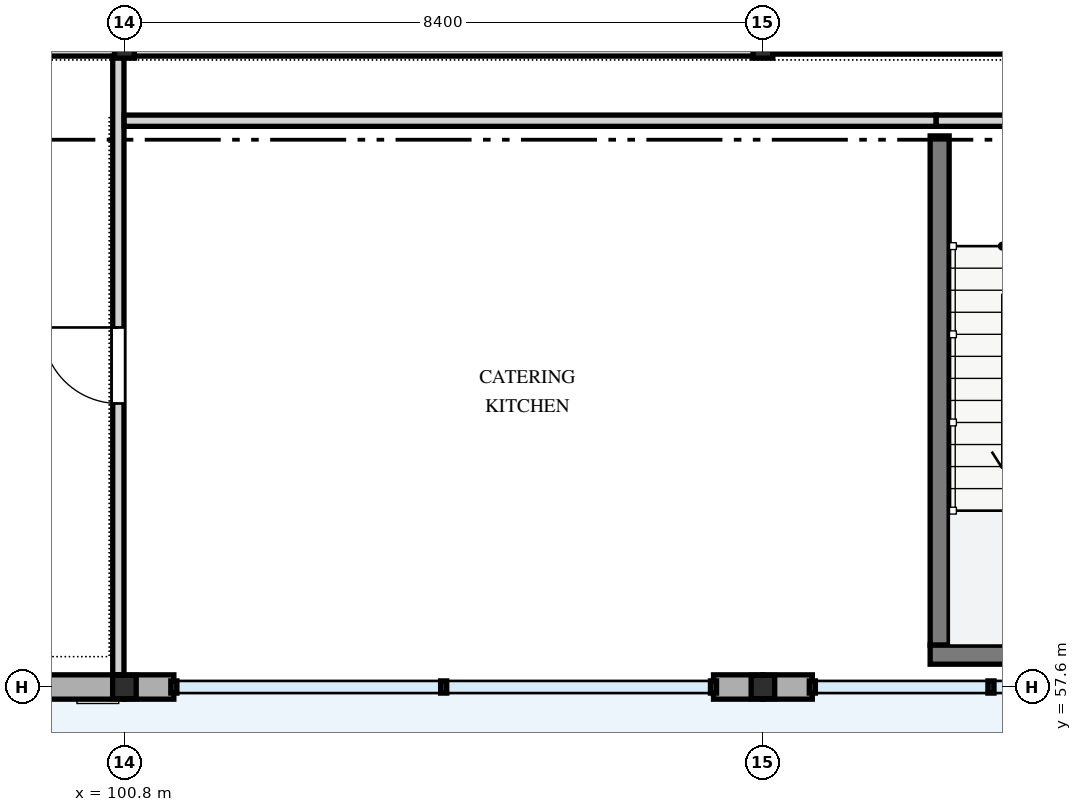
"""IFC4 building model, lengths in metres.
Left out: names, types, materials, properties, quantities, classifications, styles, units other than length and angle.
Written with IfcOpenShell. Run it as: python <this file> out.ifc"""

import sys

from ifc_helpers import new_model, si_unit, direction, frame, frame_2d, origin, origin_2d, place, context, subcontext, project, spatial, rectangle, i_section, extrude, element, fill, save


model = new_model("IFC4")
c1 = context("Model", 3, precision=1e-05, world=origin(), true_north=direction((0.0, 1.0)))
c2 = subcontext(c1, "Body", "Model", "MODEL_VIEW")
j1 = project(units=[si_unit("LENGTHUNIT", "METRE"), si_unit("PLANEANGLEUNIT", "RADIAN")], contexts=[c1])
p1 = place(None, origin())
s1 = spatial("IfcSite", under=j1, at=p1, CompositionType="ELEMENT")
p2 = place(p1, origin())
s2 = spatial("IfcBuilding", under=s1, at=p2, CompositionType="ELEMENT")
p3 = place(p2, origin())
s3 = spatial("IfcBuildingStorey", under=s2, at=p3, CompositionType="ELEMENT", Elevation=0.0)
p4 = place(p3, frame((100.8, 57.6, 0.0), z_axis=(0.0, 0.0, 1.0), x_axis=(1.0, 0.0, 0.0)))
e1 = element("IfcColumn", 1, at=p4, inside=s3, PredefinedType="COLUMN", context=c2, shape_type="SweptSolid", body=[
    extrude(i_section(OverallWidth=0.31, OverallDepth=0.308, WebThickness=0.015, FlangeThickness=0.015, FilletRadius=0.012, at=origin_2d()), origin(), (0.0, 0.0, 1.0), 4.5),
])
p5 = place(p3, frame((100.8, 66.0, 0.0), z_axis=(0.0, 0.0, 1.0), x_axis=(1.0, 0.0, 0.0)))
e2 = element("IfcColumn", 2, at=p5, inside=s3, PredefinedType="COLUMN", context=c2, shape_type="SweptSolid", body=[
    extrude(i_section(OverallWidth=0.26, OverallDepth=0.254, WebThickness=0.014, FlangeThickness=0.014, FilletRadius=0.01, at=origin_2d()), origin(), (0.0, 0.0, 1.0), 4.5),
])
p6 = place(p3, frame((109.2, 57.6, 0.0), z_axis=(0.0, 0.0, 1.0), x_axis=(1.0, 0.0, 0.0)))
e3 = element("IfcColumn", 3, at=p6, inside=s3, PredefinedType="COLUMN", context=c2, shape_type="SweptSolid", body=[
    extrude(i_section(OverallWidth=0.31, OverallDepth=0.308, WebThickness=0.015, FlangeThickness=0.015, FilletRadius=0.012, at=origin_2d()), origin(), (0.0, 0.0, 1.0), 4.5),
])
p7 = place(p3, frame((109.2, 66.0, 0.0), z_axis=(0.0, 0.0, 1.0), x_axis=(1.0, 0.0, 0.0)))
e4 = element("IfcColumn", 4, at=p7, inside=s3, PredefinedType="COLUMN", context=c2, shape_type="SweptSolid", body=[
    extrude(i_section(OverallWidth=0.26, OverallDepth=0.254, WebThickness=0.014, FlangeThickness=0.014, FilletRadius=0.01, at=origin_2d()), origin(), (0.0, 0.0, 1.0), 4.5),
])
p8 = place(p3, frame((94.8, 57.6, 0.0), z_axis=(0.0, 0.0, 1.0), x_axis=(1.0, 0.0, 0.0)))
e5 = element("IfcWall", 5, at=p8, inside=s3, PredefinedType="STANDARD", context=c2, shape_type="SweptSolid", body=[
    extrude(rectangle(XDim=6.0, YDim=0.32, at=frame_2d((3.0, 0.0))), origin(), (0.0, 0.0, 1.0), 3.722),
])
p9 = place(p8, frame((2.35, 0.0, 0.0)))
e6 = element("IfcOpeningElement", 6, at=p9, cuts=e5, PredefinedType="OPENING", context=c2, shape_type="SweptSolid", body=[
    extrude(rectangle(XDim=1.3, YDim=2.2, at=frame_2d((0.65, 1.1))), frame((0.0, 0.17, 0.0), z_axis=(0.0, -1.0, 0.0), x_axis=(1.0, 0.0, 0.0)), (0.0, 0.0, 1.0), 0.34),
])
for number, where, z_axis, x_axis in (
    (7, (100.8, 57.6, 0.0), (0.0, 0.0, 1.0), (1.0, 0.0, 0.0)),
    (8, (108.55, 57.6, 0.0), (0.0, 0.0, 1.0), (1.0, 0.0, 0.0)),
):
    element("IfcWall", number, at=place(p3, frame(where, z_axis=z_axis, x_axis=x_axis)), inside=s3, PredefinedType="STANDARD", context=c2, shape_type="SweptSolid", body=[
        extrude(rectangle(XDim=0.65, YDim=0.32, at=frame_2d((0.325, 0.0))), origin(), (0.0, 0.0, 1.0), 3.646),
    ])
p10 = place(p3, frame((109.2, 57.6, 0.0), z_axis=(0.0, 0.0, 1.0), x_axis=(1.0, 0.0, 0.0)))
e9 = element("IfcWall", 9, at=p10, inside=s3, PredefinedType="STANDARD", context=c2, shape_type="SweptSolid", body=[
    extrude(rectangle(XDim=0.65, YDim=0.32, at=frame_2d((0.325, 0.0))), origin(), (0.0, 0.0, 1.0), 3.722),
])
p11 = place(p3, frame((111.525, 64.85, 0.0), z_axis=(0.0, 0.0, 1.0), x_axis=(0.0, -1.0, 0.0)))
e10 = element("IfcWall", 10, at=p11, inside=s3, PredefinedType="SHEAR", context=c2, shape_type="SweptSolid", body=[
    extrude(rectangle(XDim=6.7, YDim=0.25, at=frame_2d((3.35, 0.0))), origin(), (0.0, 0.0, 1.0), 4.2),
])
p12 = place(p3, frame((111.4, 58.025, 0.0), z_axis=(0.0, 0.0, 1.0), x_axis=(1.0, 0.0, 0.0)))
e11 = element("IfcWall", 11, at=p12, inside=s3, PredefinedType="SHEAR", context=c2, shape_type="SweptSolid", body=[
    extrude(rectangle(XDim=3.5, YDim=0.25, at=frame_2d((1.75, 0.0))), origin(), (0.0, 0.0, 1.0), 4.2),
])
p13 = place(p3, frame((72.0, 66.0, 0.0), z_axis=(0.0, 0.0, 1.0), x_axis=(1.0, 0.0, 0.0)))
e12 = element("IfcWall", 12, at=p13, inside=s3, PredefinedType="PARTITIONING", context=c2, shape_type="SweptSolid", body=[
    extrude(rectangle(XDim=37.2, YDim=0.2, at=frame_2d((18.6, 0.0))), origin(), (0.0, 0.0, 1.0), 3.266),
])
p14 = place(p13, frame((17.001, 0.0, 0.0)))
e13 = element("IfcOpeningElement", 13, at=p14, cuts=e12, PredefinedType="OPENING", context=c2, shape_type="SweptSolid", body=[
    extrude(rectangle(XDim=1.65, YDim=2.3, at=frame_2d((0.825, 1.15))), frame((0.0, 0.11, 0.0), z_axis=(0.0, -1.0, 0.0), x_axis=(1.0, 0.0, 0.0)), (0.0, 0.0, 1.0), 0.22),
])
p15 = place(p13, frame((25.391, 0.0, 0.0)))
e14 = element("IfcOpeningElement", 14, at=p15, cuts=e12, PredefinedType="OPENING", context=c2, shape_type="SweptSolid", body=[
    extrude(rectangle(XDim=1.8, YDim=2.4, at=frame_2d((0.9, 1.2))), frame((0.0, 0.11, 0.0), z_axis=(0.0, -1.0, 0.0), x_axis=(1.0, 0.0, 0.0)), (0.0, 0.0, 1.0), 0.22),
])
p16 = place(p3, frame((109.2, 66.0, 0.0), z_axis=(0.0, 0.0, 1.0), x_axis=(1.0, 0.0, 0.0)))
e15 = element("IfcWall", 15, at=p16, inside=s3, PredefinedType="PARTITIONING", context=c2, shape_type="SweptSolid", body=[
    extrude(rectangle(XDim=5.86, YDim=0.148, at=frame_2d((2.93, 0.0))), origin(), (0.0, 0.0, 1.0), 3.722),
])
p17 = place(p3, frame((100.72, 57.762, 0.0), z_axis=(0.0, 0.0, 1.0), x_axis=(0.0, 1.0, 0.0)))
e16 = element("IfcWall", 16, at=p17, inside=s3, PredefinedType="PARTITIONING", context=c2, shape_type="SweptSolid", body=[
    extrude(rectangle(XDim=8.136, YDim=0.148, at=frame_2d((4.068, 0.0))), origin(), (0.0, 0.0, 1.0), 3.65),
])
p18 = place(p17, frame((3.568, 0.0, 0.0)))
e17 = element("IfcOpeningElement", 17, at=p18, cuts=e16, PredefinedType="OPENING", context=c2, shape_type="SweptSolid", body=[
    extrude(rectangle(XDim=1.0, YDim=2.15, at=frame_2d((0.5, 1.075))), frame((0.0, 0.084, 0.0), z_axis=(0.0, -1.0, 0.0), x_axis=(1.0, 0.0, 0.0)), (0.0, 0.0, 1.0), 0.168),
])
p19 = place(p3, frame((100.796, 65.05, 0.0), z_axis=(0.0, 0.0, 1.0), x_axis=(1.0, 0.0, 0.0)))
e18 = element("IfcWall", 18, at=p19, inside=s3, PredefinedType="PARTITIONING", context=c2, shape_type="SweptSolid", body=[
    extrude(rectangle(XDim=10.684, YDim=0.148, at=frame_2d((5.342, 0.0))), origin(), (0.0, 0.0, 1.0), 4.2),
])
p20 = place(p3, frame((111.48, 65.05, 0.0), z_axis=(0.0, 0.0, 1.0), x_axis=(1.0, 0.0, 0.0)))
e19 = element("IfcWall", 19, at=p20, inside=s3, PredefinedType="PARTITIONING", context=c2, shape_type="SweptSolid", body=[
    extrude(rectangle(XDim=3.58, YDim=0.148, at=frame_2d((1.79, 0.0))), origin(), (0.0, 0.0, 1.0), 4.2),
])
p21 = place(p20, frame((1.25, 0.0, 0.0)))
e20 = element("IfcOpeningElement", 20, at=p21, cuts=e19, PredefinedType="OPENING", context=c2, shape_type="SweptSolid", body=[
    extrude(rectangle(XDim=0.95, YDim=2.1, at=frame_2d((0.475, 1.05))), frame((0.0, 0.084, 0.0), z_axis=(0.0, -1.0, 0.0), x_axis=(1.0, 0.0, 0.0)), (0.0, 0.0, 1.0), 0.168),
])
p22 = place(p18, origin())
e21 = element("IfcDoor", 21, at=p22, inside=s3, OperationType="SINGLE_SWING_RIGHT", PredefinedType="DOOR", context=c2, shape_type="SweptSolid", body=[
    extrude(rectangle(XDim=1.0, YDim=2.15, at=frame_2d((0.5, 1.075))), frame((0.0, 0.025, 0.0), z_axis=(0.0, -1.0, 0.0), x_axis=(1.0, 0.0, 0.0)), (0.0, 0.0, 1.0), 0.05),
])
fill(e17, e21)
save(model, sys.argv[1])
